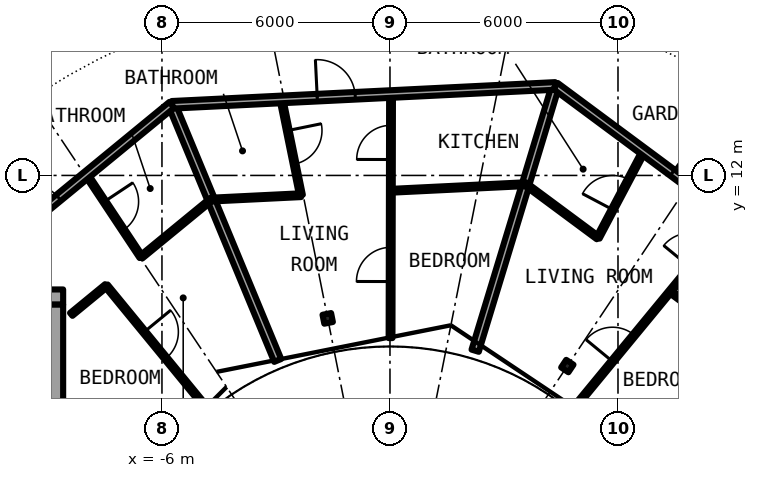
"""IFC4 building model, lengths in metres.
Left out: names, types, materials, properties, quantities, classifications, styles, units other than length and angle.
Written with IfcOpenShell. Run it as: python <this file> out.ifc"""

import sys

from ifc_helpers import new_model, si_unit, direction, frame, frame_2d, origin, origin_2d, place, context, subcontext, project, spatial, rectangle, i_section, extrude, element, fill, save


model = new_model("IFC4")
c1 = context("Model", 3, precision=1e-05, world=origin(), true_north=direction((0.0, 1.0)))
c2 = subcontext(c1, "Body", "Model", "MODEL_VIEW")
j1 = project(units=[si_unit("LENGTHUNIT", "METRE"), si_unit("PLANEANGLEUNIT", "RADIAN")], contexts=[c1])
p1 = place(None, origin())
s1 = spatial("IfcSite", under=j1, at=p1, CompositionType="ELEMENT")
p2 = place(p1, origin())
s2 = spatial("IfcBuilding", under=s1, at=p2, CompositionType="ELEMENT")
p3 = place(p2, frame((0.0, 0.0, 246.25)))
s3 = spatial("IfcBuildingStorey", under=s2, at=p3, CompositionType="ELEMENT", Elevation=246.25)
for number, where, z_axis, x_axis in (
    (1, (4.667, 6.984, 0.0), (0.0, 0.0, 1.0), (0.556, 0.831, 0.0)),
    (2, (-1.639, 8.239, 0.0), (0.0, 0.0, 1.0), (-0.195, 0.981, 0.0)),
):
    element("IfcColumn", number, at=place(p3, frame(where, z_axis=z_axis, x_axis=x_axis)), inside=s3, PredefinedType="COLUMN", context=c2, shape_type="SweptSolid", body=[
        extrude(i_section(OverallWidth=0.24, OverallDepth=0.23, WebThickness=0.008, FlangeThickness=0.012, FilletRadius=0.021, at=origin_2d()), origin(), (0.0, 0.0, 1.0), 3.05),
    ])
p4 = place(p3, frame((-8.6, 8.8, 0.0), z_axis=(0.0, 0.0, 1.0), x_axis=(-1.0, 0.0, 0.0)))
e3 = element("IfcWall", 3, at=p4, inside=s3, PredefinedType="SHEAR", context=c2, shape_type="SweptSolid", body=[
    extrude(rectangle(XDim=13.4, YDim=0.4, at=frame_2d((6.7, 0.0))), origin(), (0.0, 0.0, 1.0), 3.05),
])
p5 = place(p4, frame((11.275, 0.0, 0.0)))
e4 = element("IfcOpeningElement", 4, at=p5, cuts=e3, PredefinedType="OPENING", context=c2, shape_type="SweptSolid", body=[
    extrude(rectangle(XDim=1.2, YDim=2.3, at=frame_2d((0.6, 1.15))), frame((0.0, 0.21, 0.0), z_axis=(0.0, -1.0, 0.0), x_axis=(1.0, 0.0, 0.0)), (0.0, 0.0, 1.0), 0.42),
])
p6 = place(p3, frame((-8.8, 8.6, 0.0), z_axis=(0.0, 0.0, 1.0), x_axis=(0.0, -1.0, 0.0)))
e5 = element("IfcWall", 5, at=p6, inside=s3, PredefinedType="SHEAR", context=c2, shape_type="SweptSolid", body=[
    extrude(rectangle(XDim=17.2, YDim=0.4, at=frame_2d((8.6, 0.0))), origin(), (0.0, 0.0, 1.0), 3.05),
])
p7 = place(p6, frame((7.4, 0.0, 0.1)))
e6 = element("IfcOpeningElement", 6, at=p7, cuts=e5, PredefinedType="OPENING", context=c2, shape_type="SweptSolid", body=[
    extrude(rectangle(XDim=2.4, YDim=2.2, at=frame_2d((1.2, 1.1))), frame((0.0, 0.21, 0.0), z_axis=(0.0, -1.0, 0.0), x_axis=(1.0, 0.0, 0.0)), (0.0, 0.0, 1.0), 0.42),
])
p8 = place(p3, frame((-7.984, 12.017, 0.0), z_axis=(0.0, 0.0, 1.0), x_axis=(0.553289146762, -0.832989267683, 0.0)))
e7 = element("IfcWall", 7, at=p8, inside=s3, PredefinedType="PARTITIONING", context=c2, shape_type="SweptSolid", body=[
    extrude(rectangle(XDim=2.597, YDim=0.1, at=frame_2d((1.298, 0.0))), origin(), (0.0, 0.0, 1.0), 2.7),
])
p9 = place(p8, frame((0.848, 0.0, 0.0)))
e8 = element("IfcOpeningElement", 8, at=p9, cuts=e7, PredefinedType="OPENING", context=c2, shape_type="SweptSolid", body=[
    extrude(rectangle(XDim=0.9, YDim=2.3, at=frame_2d((0.45, 1.15))), frame((0.0, 0.06, 0.0), z_axis=(0.0, -1.0, 0.0), x_axis=(1.0, 0.0, 0.0)), (0.0, 0.0, 1.0), 0.12),
])
p10 = place(p3, frame((-7.467, 9.099, 0.0), z_axis=(0.0, 0.0, 1.0), x_axis=(0.634313840507, -0.773075644256, 0.0)))
e9 = element("IfcWall", 9, at=p10, inside=s3, PredefinedType="PARTITIONING", context=c2, shape_type="SweptSolid", body=[
    extrude(rectangle(XDim=4.05, YDim=0.1, at=frame_2d((2.025, 0.0))), origin(), (0.0, 0.0, 1.0), 2.7),
])
p11 = place(p10, frame((1.575, 0.0, 0.0)))
e10 = element("IfcOpeningElement", 10, at=p11, cuts=e9, PredefinedType="OPENING", context=c2, shape_type="SweptSolid", body=[
    extrude(rectangle(XDim=0.9, YDim=2.3, at=frame_2d((0.45, 1.15))), frame((0.0, 0.06, 0.0), z_axis=(0.0, -1.0, 0.0), x_axis=(1.0, 0.0, 0.0)), (0.0, 0.0, 1.0), 0.12),
])
p12 = place(p3, frame((-5.74, 13.858, 0.0), z_axis=(0.0, 0.0, 1.0), x_axis=(0.38267858248, -0.923881541385, 0.0)))
e11 = element("IfcWall", 11, at=p12, inside=s3, PredefinedType="PARTITIONING", context=c2, shape_type="SweptSolid", body=[
    extrude(rectangle(XDim=7.28, YDim=0.2, at=frame_2d((3.64, 0.0))), origin(), (0.0, 0.0, 1.0), 2.7),
])
p13 = place(p3, frame((-2.856, 14.0, 0.0), z_axis=(0.0, 0.0, 1.0), x_axis=(0.199820523641, -0.979832515449, 0.0)))
e12 = element("IfcWall", 12, at=p13, inside=s3, PredefinedType="PARTITIONING", context=c2, shape_type="SweptSolid", body=[
    extrude(rectangle(XDim=2.572, YDim=0.1, at=frame_2d((1.286, 0.0))), origin(), (0.0, 0.0, 1.0), 2.7),
])
p14 = place(p13, frame((0.836, 0.0, 0.0)))
e13 = element("IfcOpeningElement", 13, at=p14, cuts=e12, PredefinedType="OPENING", context=c2, shape_type="SweptSolid", body=[
    extrude(rectangle(XDim=0.9, YDim=2.3, at=frame_2d((0.45, 1.15))), frame((0.0, 0.06, 0.0), z_axis=(0.0, -1.0, 0.0), x_axis=(1.0, 0.0, 0.0)), (0.0, 0.0, 1.0), 0.12),
])
p15 = place(p3, frame((0.015, 7.72, 0.0), z_axis=(0.0, 0.0, 1.0), x_axis=(0.00205283734, 0.999997892927, 0.0)))
e14 = element("IfcWall", 14, at=p15, inside=s3, PredefinedType="PARTITIONING", context=c2, shape_type="SweptSolid", body=[
    extrude(rectangle(XDim=6.422, YDim=0.1, at=frame_2d((3.211, 0.0))), origin(), (0.0, 0.0, 1.0), 2.7),
])
p16 = place(p15, frame((4.699, 0.0, 0.0)))
e15 = element("IfcOpeningElement", 15, at=p16, cuts=e14, PredefinedType="OPENING", context=c2, shape_type="SweptSolid", body=[
    extrude(rectangle(XDim=0.9, YDim=2.3, at=frame_2d((0.45, 1.15))), frame((0.0, 0.06, 0.0), z_axis=(0.0, -1.0, 0.0), x_axis=(1.0, 0.0, 0.0)), (0.0, 0.0, 1.0), 0.12),
])
p17 = place(p15, frame((1.488, 0.0, 0.0)))
e16 = element("IfcOpeningElement", 16, at=p17, cuts=e14, PredefinedType="OPENING", context=c2, shape_type="SweptSolid", body=[
    extrude(rectangle(XDim=0.9, YDim=2.3, at=frame_2d((0.45, 1.15))), frame((0.0, 0.06, 0.0), z_axis=(0.0, -1.0, 0.0), x_axis=(1.0, 0.0, 0.0)), (0.0, 0.0, 1.0), 0.12),
])
p18 = place(p3, frame((2.242, 7.388, 0.0), z_axis=(0.0, 0.0, 1.0), x_axis=(0.291087364513, 0.956696475493, 0.0)))
e17 = element("IfcWall", 17, at=p18, inside=s3, PredefinedType="PARTITIONING", context=c2, shape_type="SweptSolid", body=[
    extrude(rectangle(XDim=4.579, YDim=0.2, at=frame_2d((2.29, 0.0))), origin(), (0.0, 0.0, 1.0), 2.7),
])
p19 = place(p3, frame((3.571, 11.77, 0.0), z_axis=(0.0, 0.0, 1.0), x_axis=(0.289984808601, 0.957031248592, 0.0)))
e18 = element("IfcWall", 18, at=p19, inside=s3, PredefinedType="PARTITIONING", context=c2, shape_type="SweptSolid", body=[
    extrude(rectangle(XDim=2.7, YDim=0.2, at=frame_2d((1.35, 0.0))), origin(), (0.0, 0.0, 1.0), 2.7),
])
p20 = place(p3, frame((4.909, 5.958, 0.0), z_axis=(0.0, 0.0, 1.0), x_axis=(0.635941750694, 0.771737059965, 0.0)))
e19 = element("IfcWall", 19, at=p20, inside=s3, PredefinedType="PARTITIONING", context=c2, shape_type="SweptSolid", body=[
    extrude(rectangle(XDim=6.422, YDim=0.1, at=frame_2d((3.211, 0.0))), origin(), (0.0, 0.0, 1.0), 2.7),
])
p21 = place(p20, frame((4.699, 0.0, 0.0)))
e20 = element("IfcOpeningElement", 20, at=p21, cuts=e19, PredefinedType="OPENING", context=c2, shape_type="SweptSolid", body=[
    extrude(rectangle(XDim=0.9, YDim=2.3, at=frame_2d((0.45, 1.15))), frame((0.0, 0.06, 0.0), z_axis=(0.0, -1.0, 0.0), x_axis=(1.0, 0.0, 0.0)), (0.0, 0.0, 1.0), 0.12),
])
p22 = place(p20, frame((1.488, 0.0, 0.0)))
e21 = element("IfcOpeningElement", 21, at=p22, cuts=e19, PredefinedType="OPENING", context=c2, shape_type="SweptSolid", body=[
    extrude(rectangle(XDim=0.9, YDim=2.3, at=frame_2d((0.45, 1.15))), frame((0.0, 0.06, 0.0), z_axis=(0.0, -1.0, 0.0), x_axis=(1.0, 0.0, 0.0)), (0.0, 0.0, 1.0), 0.12),
])
p23 = place(p3, frame((5.472, 10.36, 0.0), z_axis=(0.0, 0.0, 1.0), x_axis=(0.467373035141, 0.884060204976, 0.0)))
e22 = element("IfcWall", 22, at=p23, inside=s3, PredefinedType="PARTITIONING", context=c2, shape_type="SweptSolid", body=[
    extrude(rectangle(XDim=2.572, YDim=0.1, at=frame_2d((1.286, 0.0))), origin(), (0.0, 0.0, 1.0), 2.7),
])
p24 = place(p23, frame((0.836, 0.0, 0.0)))
e23 = element("IfcOpeningElement", 23, at=p24, cuts=e22, PredefinedType="OPENING", context=c2, shape_type="SweptSolid", body=[
    extrude(rectangle(XDim=0.9, YDim=2.3, at=frame_2d((0.45, 1.15))), frame((0.0, 0.06, 0.0), z_axis=(0.0, -1.0, 0.0), x_axis=(1.0, 0.0, 0.0)), (0.0, 0.0, 1.0), 0.12),
])
p25 = place(p3, frame((-4.707, 11.364, 0.0), z_axis=(0.0, 0.0, 1.0), x_axis=(0.998799958351, 0.048975945103, 0.0)))
e24 = element("IfcWall", 24, at=p25, inside=s3, PredefinedType="PARTITIONING", context=c2, shape_type="SweptSolid", body=[
    extrude(rectangle(XDim=2.368, YDim=0.1, at=frame_2d((1.184, 0.0))), origin(), (0.0, 0.0, 1.0), 2.7),
])
p26 = place(p3, frame((0.023, 11.596, 0.0), z_axis=(0.0, 0.0, 1.0), x_axis=(0.998798689193, 0.049001821055, 0.0)))
e25 = element("IfcWall", 25, at=p26, inside=s3, PredefinedType="PARTITIONING", context=c2, shape_type="SweptSolid", body=[
    extrude(rectangle(XDim=3.552, YDim=0.1, at=frame_2d((1.776, 0.0))), origin(), (0.0, 0.0, 1.0), 2.7),
])
p27 = place(p3, frame((3.569, 11.77, 0.0), z_axis=(0.0, 0.0, 1.0), x_axis=(0.803379855413, -0.5954668823, 0.0)))
e26 = element("IfcWall", 26, at=p27, inside=s3, PredefinedType="PARTITIONING", context=c2, shape_type="SweptSolid", body=[
    extrude(rectangle(XDim=2.366, YDim=0.1, at=frame_2d((1.183, 0.0))), origin(), (0.0, 0.0, 1.0), 2.7),
])
p28 = place(p3, frame((7.374, 8.949, 0.0), z_axis=(0.0, 0.0, 1.0), x_axis=(0.80332760487, -0.595537370157, 0.0)))
e27 = element("IfcWall", 27, at=p28, inside=s3, PredefinedType="PARTITIONING", context=c2, shape_type="SweptSolid", body=[
    extrude(rectangle(XDim=1.526, YDim=0.1, at=frame_2d((0.763, 0.0))), origin(), (0.0, 0.0, 1.0), 2.7),
])
p29 = place(p3, frame((-8.387, 8.344, 0.0), z_axis=(0.0, 0.0, 1.0), x_axis=(0.772869802794, 0.634564628646, 0.0)))
e28 = element("IfcWall", 28, at=p29, inside=s3, PredefinedType="PARTITIONING", context=c2, shape_type="SweptSolid", body=[
    extrude(rectangle(XDim=1.192, YDim=0.1, at=frame_2d((0.596, 0.0))), origin(), (0.0, 0.0, 1.0), 2.7),
])
p30 = place(p3, frame((-6.547, 9.854, 0.0), z_axis=(0.0, 0.0, 1.0), x_axis=(0.773033390712, 0.634365333893, 0.0)))
e29 = element("IfcWall", 29, at=p30, inside=s3, PredefinedType="PARTITIONING", context=c2, shape_type="SweptSolid", body=[
    extrude(rectangle(XDim=2.38, YDim=0.1, at=frame_2d((1.19, 0.0))), origin(), (0.0, 0.0, 1.0), 2.7),
])
p31 = place(p3, frame((-5.74, 13.858, 0.0), z_axis=(0.0, 0.0, 1.0), x_axis=(0.998789005292, 0.049198810025, 0.0)))
e30 = element("IfcWall", 30, at=p31, inside=s3, PredefinedType="PARTITIONING", context=c2, shape_type="SweptSolid", body=[
    extrude(rectangle(XDim=10.103, YDim=0.2, at=frame_2d((5.052, 0.0))), origin(), (0.0, 0.0, 1.0), 2.7),
])
p32 = place(p31, frame((3.831, 0.0, 0.0)))
e31 = element("IfcOpeningElement", 31, at=p32, cuts=e30, PredefinedType="OPENING", context=c2, shape_type="SweptSolid", body=[
    extrude(rectangle(XDim=1.0, YDim=2.3, at=frame_2d((0.5, 1.15))), frame((0.0, 0.11, 0.0), z_axis=(0.0, -1.0, 0.0), x_axis=(1.0, 0.0, 0.0)), (0.0, 0.0, 1.0), 0.22),
])
p33 = place(p3, frame((4.355, 14.353, 0.0), z_axis=(0.0, 0.0, 1.0), x_axis=(0.80325776554, -0.595631565735, 0.0)))
e32 = element("IfcWall", 32, at=p33, inside=s3, PredefinedType="PARTITIONING", context=c2, shape_type="SweptSolid", body=[
    extrude(rectangle(XDim=8.987, YDim=0.2, at=frame_2d((4.494, 0.0))), origin(), (0.0, 0.0, 1.0), 2.7),
])
p34 = place(p33, frame((3.83, 0.0, 0.0)))
e33 = element("IfcOpeningElement", 33, at=p34, cuts=e32, PredefinedType="OPENING", context=c2, shape_type="SweptSolid", body=[
    extrude(rectangle(XDim=1.0, YDim=2.3, at=frame_2d((0.5, 1.15))), frame((0.0, 0.11, 0.0), z_axis=(0.0, -1.0, 0.0), x_axis=(1.0, 0.0, 0.0)), (0.0, 0.0, 1.0), 0.22),
])
p35 = place(p3, frame((-10.228, 10.175, 0.0), z_axis=(0.0, 0.0, 1.0), x_axis=(0.772989261861, 0.634419105204, 0.0)))
e34 = element("IfcWall", 34, at=p35, inside=s3, PredefinedType="PARTITIONING", context=c2, shape_type="SweptSolid", body=[
    extrude(rectangle(XDim=5.803, YDim=0.2, at=frame_2d((2.902, 0.0))), origin(), (0.0, 0.0, 1.0), 2.7),
])
p36 = place(p35, frame((0.952, 0.0, 0.0)))
e35 = element("IfcOpeningElement", 35, at=p36, cuts=e34, PredefinedType="OPENING", context=c2, shape_type="SweptSolid", body=[
    extrude(rectangle(XDim=1.0, YDim=2.3, at=frame_2d((0.5, 1.15))), frame((0.0, 0.11, 0.0), z_axis=(0.0, -1.0, 0.0), x_axis=(1.0, 0.0, 0.0)), (0.0, 0.0, 1.0), 0.22),
])
p37 = place(p34, origin())
e36 = element("IfcDoor", 36, at=p37, inside=s3, OperationType="SINGLE_SWING_LEFT", PredefinedType="DOOR", context=c2, shape_type="SweptSolid", body=[
    extrude(rectangle(XDim=1.0, YDim=2.3, at=frame_2d((0.5, 1.15))), frame((0.0, 0.025, 0.0), z_axis=(0.0, -1.0, 0.0), x_axis=(1.0, 0.0, 0.0)), (0.0, 0.0, 1.0), 0.05),
])
fill(e33, e36)
p38 = place(p24, origin())
e37 = element("IfcDoor", 37, at=p38, inside=s3, OperationType="SINGLE_SWING_LEFT", PredefinedType="DOOR", context=c2, shape_type="SweptSolid", body=[
    extrude(rectangle(XDim=0.9, YDim=2.3, at=frame_2d((0.45, 1.15))), frame((0.0, 0.025, 0.0), z_axis=(0.0, -1.0, 0.0), x_axis=(1.0, 0.0, 0.0)), (0.0, 0.0, 1.0), 0.05),
])
fill(e23, e37)
p39 = place(p22, origin())
e38 = element("IfcDoor", 38, at=p39, inside=s3, OperationType="SINGLE_SWING_LEFT", PredefinedType="DOOR", context=c2, shape_type="SweptSolid", body=[
    extrude(rectangle(XDim=0.9, YDim=2.3, at=frame_2d((0.45, 1.15))), frame((0.0, 0.025, 0.0), z_axis=(0.0, -1.0, 0.0), x_axis=(1.0, 0.0, 0.0)), (0.0, 0.0, 1.0), 0.05),
])
fill(e21, e38)
p40 = place(p32, origin())
e39 = element("IfcDoor", 39, at=p40, inside=s3, OperationType="SINGLE_SWING_LEFT", PredefinedType="DOOR", context=c2, shape_type="SweptSolid", body=[
    extrude(rectangle(XDim=1.0, YDim=2.3, at=frame_2d((0.5, 1.15))), frame((0.0, 0.025, 0.0), z_axis=(0.0, -1.0, 0.0), x_axis=(1.0, 0.0, 0.0)), (0.0, 0.0, 1.0), 0.05),
])
fill(e31, e39)
p41 = place(p14, origin())
e40 = element("IfcDoor", 40, at=p41, inside=s3, OperationType="SINGLE_SWING_RIGHT", PredefinedType="DOOR", context=c2, shape_type="SweptSolid", body=[
    extrude(rectangle(XDim=0.9, YDim=2.3, at=frame_2d((0.45, 1.15))), frame((0.0, 0.025, 0.0), z_axis=(0.0, -1.0, 0.0), x_axis=(1.0, 0.0, 0.0)), (0.0, 0.0, 1.0), 0.05),
])
fill(e13, e40)
p42 = place(p16, origin())
e41 = element("IfcDoor", 41, at=p42, inside=s3, OperationType="SINGLE_SWING_RIGHT", PredefinedType="DOOR", context=c2, shape_type="SweptSolid", body=[
    extrude(rectangle(XDim=0.9, YDim=2.3, at=frame_2d((0.45, 1.15))), frame((0.0, 0.025, 0.0), z_axis=(0.0, -1.0, 0.0), x_axis=(1.0, 0.0, 0.0)), (0.0, 0.0, 1.0), 0.05),
])
fill(e15, e41)
p43 = place(p17, origin())
e42 = element("IfcDoor", 42, at=p43, inside=s3, OperationType="SINGLE_SWING_LEFT", PredefinedType="DOOR", context=c2, shape_type="SweptSolid", body=[
    extrude(rectangle(XDim=0.9, YDim=2.3, at=frame_2d((0.45, 1.15))), frame((0.0, 0.025, 0.0), z_axis=(0.0, -1.0, 0.0), x_axis=(1.0, 0.0, 0.0)), (0.0, 0.0, 1.0), 0.05),
])
fill(e16, e42)
p44 = place(p36, origin())
e43 = element("IfcDoor", 43, at=p44, inside=s3, OperationType="SINGLE_SWING_LEFT", PredefinedType="DOOR", context=c2, shape_type="SweptSolid", body=[
    extrude(rectangle(XDim=1.0, YDim=2.3, at=frame_2d((0.5, 1.15))), frame((0.0, 0.025, 0.0), z_axis=(0.0, -1.0, 0.0), x_axis=(1.0, 0.0, 0.0)), (0.0, 0.0, 1.0), 0.05),
])
fill(e35, e43)
p45 = place(p9, origin())
e44 = element("IfcDoor", 44, at=p45, inside=s3, OperationType="SINGLE_SWING_RIGHT", PredefinedType="DOOR", context=c2, shape_type="SweptSolid", body=[
    extrude(rectangle(XDim=0.9, YDim=2.3, at=frame_2d((0.45, 1.15))), frame((0.0, 0.025, 0.0), z_axis=(0.0, -1.0, 0.0), x_axis=(1.0, 0.0, 0.0)), (0.0, 0.0, 1.0), 0.05),
])
fill(e8, e44)
p46 = place(p11, origin())
e45 = element("IfcDoor", 45, at=p46, inside=s3, OperationType="SINGLE_SWING_RIGHT", PredefinedType="DOOR", context=c2, shape_type="SweptSolid", body=[
    extrude(rectangle(XDim=0.9, YDim=2.3, at=frame_2d((0.45, 1.15))), frame((0.0, 0.025, 0.0), z_axis=(0.0, -1.0, 0.0), x_axis=(1.0, 0.0, 0.0)), (0.0, 0.0, 1.0), 0.05),
])
fill(e10, e45)
save(model, sys.argv[1])
